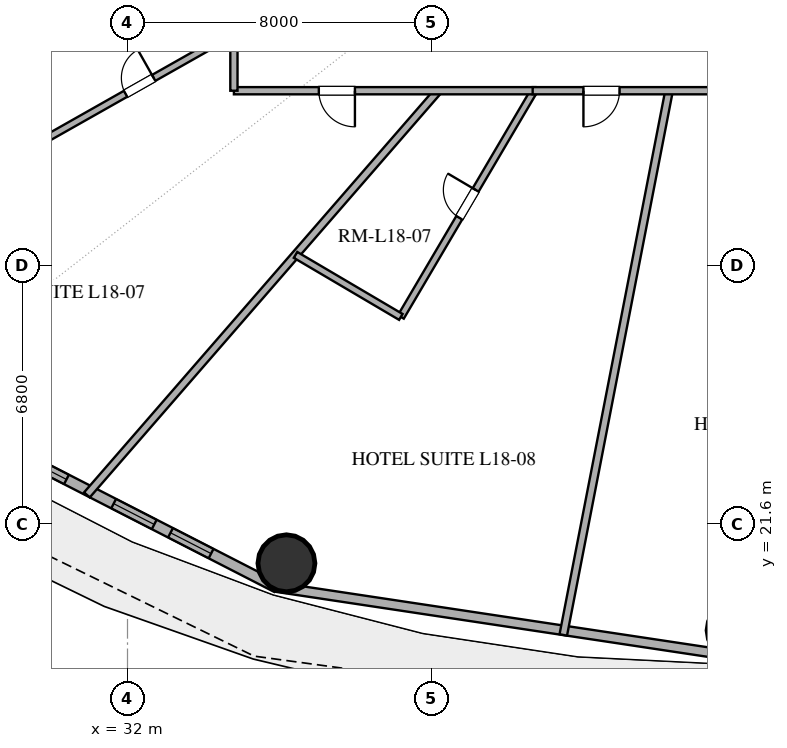
"""IFC4 building model, lengths in metres.
Left out: names, types, materials, properties, quantities, classifications, styles, units other than length and angle.
Written with IfcOpenShell. Run it as: python <this file> out.ifc"""

import sys

from ifc_helpers import new_model, si_unit, direction, frame, frame_2d, origin, origin_2d, place, context, subcontext, project, spatial, rectangle, hollow_circle, extrude, element, fill, save


model = new_model("IFC4")
c1 = context("Model", 3, precision=1e-05, world=origin(), true_north=direction((0.0, 1.0)))
c2 = subcontext(c1, "Body", "Model", "MODEL_VIEW")
j1 = project(units=[si_unit("LENGTHUNIT", "METRE"), si_unit("PLANEANGLEUNIT", "RADIAN")], contexts=[c1])
p1 = place(None, origin())
s1 = spatial("IfcSite", under=j1, at=p1, CompositionType="ELEMENT")
p2 = place(p1, origin())
s2 = spatial("IfcBuilding", under=s1, at=p2, CompositionType="ELEMENT")
p3 = place(p2, frame((0.0, 0.0, 75.0)))
s3 = spatial("IfcBuildingStorey", under=s2, at=p3, CompositionType="ELEMENT", Elevation=75.0)
p4 = place(p3, frame((36.182, 20.566, 0.0), z_axis=(0.0, 0.0, 1.0), x_axis=(1.0, 0.0, 0.0)))
e1 = element("IfcColumn", 1, at=p4, inside=s3, PredefinedType="COLUMN", context=c2, shape_type="SweptSolid", body=[
    extrude(hollow_circle(Radius=0.75, WallThickness=0.04, at=origin_2d()), origin(), (0.0, 0.0, 1.0), 3.25),
])
p5 = place(p3, frame((25.826, 25.114, 0.0), z_axis=(0.0, 0.0, 1.0), x_axis=(0.889853976658, -0.456245438581, 0.0)))
e2 = element("IfcWall", 2, at=p5, inside=s3, PredefinedType="SOLIDWALL", context=c2, shape_type="SweptSolid", body=[
    extrude(rectangle(XDim=11.346, YDim=0.28, at=frame_2d((5.673, 0.0))), origin(), (0.0, 0.0, 1.0), 3.25),
])
p6 = place(p5, frame((2.02, 0.0, 0.85)))
e3 = element("IfcOpeningElement", 3, at=p6, cuts=e2, PredefinedType="OPENING", context=c2, shape_type="SweptSolid", body=[
    extrude(rectangle(XDim=1.35, YDim=1.8, at=frame_2d((0.675, 0.9))), frame((0.0, 0.15, 0.0), z_axis=(0.0, -1.0, 0.0), x_axis=(1.0, 0.0, 0.0)), (0.0, 0.0, 1.0), 0.3),
])
p7 = place(p5, frame((3.784, 0.0, 0.85)))
e4 = element("IfcOpeningElement", 4, at=p7, cuts=e2, PredefinedType="OPENING", context=c2, shape_type="SweptSolid", body=[
    extrude(rectangle(XDim=1.35, YDim=1.8, at=frame_2d((0.675, 0.9))), frame((0.0, 0.15, 0.0), z_axis=(0.0, -1.0, 0.0), x_axis=(1.0, 0.0, 0.0)), (0.0, 0.0, 1.0), 0.3),
])
p8 = place(p5, frame((6.529, 0.0, 0.85)))
e5 = element("IfcOpeningElement", 5, at=p8, cuts=e2, PredefinedType="OPENING", context=c2, shape_type="SweptSolid", body=[
    extrude(rectangle(XDim=1.2, YDim=1.8, at=frame_2d((0.6, 0.9))), frame((0.0, 0.15, 0.0), z_axis=(0.0, -1.0, 0.0), x_axis=(1.0, 0.0, 0.0)), (0.0, 0.0, 1.0), 0.3),
])
p9 = place(p5, frame((8.21, 0.0, 0.85)))
e6 = element("IfcOpeningElement", 6, at=p9, cuts=e2, PredefinedType="OPENING", context=c2, shape_type="SweptSolid", body=[
    extrude(rectangle(XDim=1.2, YDim=1.8, at=frame_2d((0.6, 0.9))), frame((0.0, 0.15, 0.0), z_axis=(0.0, -1.0, 0.0), x_axis=(1.0, 0.0, 0.0)), (0.0, 0.0, 1.0), 0.3),
])
p10 = place(p3, frame((35.922, 19.938, 0.0), z_axis=(0.0, 0.0, 1.0), x_axis=(0.988864835849, -0.148816452121, 0.0)))
e7 = element("IfcWall", 7, at=p10, inside=s3, PredefinedType="SOLIDWALL", context=c2, shape_type="SweptSolid", body=[
    extrude(rectangle(XDim=12.214, YDim=0.25, at=frame_2d((6.107, 0.0))), origin(), (0.0, 0.0, 1.0), 3.25),
])
p11 = place(p3, frame((43.467, 18.681, 0.0), z_axis=(0.0, 0.0, 1.0), x_axis=(0.190799326792, 0.981629062781, 0.0)))
e8 = element("IfcWall", 8, at=p11, inside=s3, PredefinedType="PARTITIONING", context=c2, shape_type="SweptSolid", body=[
    extrude(rectangle(XDim=14.587, YDim=0.2, at=frame_2d((7.293, 0.0))), origin(), (0.0, 0.0, 1.0), 2.61),
])
p12 = place(p3, frame((34.8, 37.455, 0.0), z_axis=(0.0, 0.0, 1.0), x_axis=(-0.945518845989, -0.325567369186, 0.0)))
e9 = element("IfcWall", 9, at=p12, inside=s3, PredefinedType="PARTITIONING", context=c2, shape_type="SweptSolid", body=[
    extrude(rectangle(XDim=15.909, YDim=0.2, at=frame_2d((7.955, 0.0))), origin(), (0.0, 0.0, 1.0), 2.61),
])
p13 = place(p3, frame((40.177, 33.0, 0.0), z_axis=(0.0, 0.0, 1.0), x_axis=(-0.656066321773, -0.754703240641, 0.0)))
e10 = element("IfcWall", 10, at=p13, inside=s3, PredefinedType="PARTITIONING", context=c2, shape_type="SweptSolid", body=[
    extrude(rectangle(XDim=14.091, YDim=0.2, at=frame_2d((7.045, 0.0))), origin(), (0.0, 0.0, 1.0), 2.61),
])
p14 = place(p3, frame((39.193, 27.048, 0.0), z_axis=(0.0, 0.0, 1.0), x_axis=(0.507529744585, 0.861634236995, 0.0)))
e11 = element("IfcWall", 11, at=p14, inside=s3, PredefinedType="PLUMBINGWALL", context=c2, shape_type="SweptSolid", body=[
    extrude(rectangle(XDim=6.908, YDim=0.18, at=frame_2d((3.454, 0.0))), origin(), (0.0, 0.0, 1.0), 2.61),
])
p15 = place(p14, frame((3.029, 0.0, 0.0)))
e12 = element("IfcOpeningElement", 12, at=p15, cuts=e11, PredefinedType="OPENING", context=c2, shape_type="SweptSolid", body=[
    extrude(rectangle(XDim=0.85, YDim=2.1, at=frame_2d((0.425, 1.05))), frame((0.0, 0.1, 0.0), z_axis=(0.0, -1.0, 0.0), x_axis=(1.0, 0.0, 0.0)), (0.0, 0.0, 1.0), 0.2),
])
p16 = place(p3, frame((29.837, 31.724, 0.0), z_axis=(0.0, 0.0, 1.0), x_axis=(0.870364197206, 0.492408533865, 0.0)))
e13 = element("IfcWall", 13, at=p16, inside=s3, PredefinedType="PLUMBINGWALL", context=c2, shape_type="SweptSolid", body=[
    extrude(rectangle(XDim=5.702, YDim=0.18, at=frame_2d((2.851, 0.0))), origin(), (0.0, 0.0, 1.0), 2.61),
])
p17 = place(p16, frame((2.426, 0.0, 0.0)))
e14 = element("IfcOpeningElement", 14, at=p17, cuts=e13, PredefinedType="OPENING", context=c2, shape_type="SweptSolid", body=[
    extrude(rectangle(XDim=0.85, YDim=2.1, at=frame_2d((0.425, 1.05))), frame((0.0, 0.1, 0.0), z_axis=(0.0, -1.0, 0.0), x_axis=(1.0, 0.0, 0.0)), (0.0, 0.0, 1.0), 0.2),
])
p18 = place(p3, frame((42.736, 33.0, 0.0), z_axis=(0.0, 0.0, 1.0), x_axis=(-1.0, 0.0, 0.0)))
e15 = element("IfcWall", 15, at=p18, inside=s3, PredefinedType="PARTITIONING", context=c2, shape_type="SweptSolid", body=[
    extrude(rectangle(XDim=7.936, YDim=0.19, at=frame_2d((3.968, 0.0))), origin(), (0.0, 0.0, 1.0), 2.61),
])
p19 = place(p18, frame((4.751, 0.0, 0.0)))
e16 = element("IfcOpeningElement", 16, at=p19, cuts=e15, PredefinedType="OPENING", context=c2, shape_type="SweptSolid", body=[
    extrude(rectangle(XDim=0.95, YDim=2.15, at=frame_2d((0.475, 1.075))), frame((0.0, 0.105, 0.0), z_axis=(0.0, -1.0, 0.0), x_axis=(1.0, 0.0, 0.0)), (0.0, 0.0, 1.0), 0.21),
])
p20 = place(p3, frame((51.133, 33.0, 0.0), z_axis=(0.0, 0.0, 1.0), x_axis=(-1.0, 0.0, 0.0)))
e17 = element("IfcWall", 17, at=p20, inside=s3, PredefinedType="PARTITIONING", context=c2, shape_type="SweptSolid", body=[
    extrude(rectangle(XDim=8.471, YDim=0.19, at=frame_2d((4.236, 0.0))), origin(), (0.0, 0.0, 1.0), 2.61),
])
p21 = place(p20, frame((1.957, 0.0, 0.0)))
e18 = element("IfcOpeningElement", 18, at=p21, cuts=e17, PredefinedType="OPENING", context=c2, shape_type="SweptSolid", body=[
    extrude(rectangle(XDim=1.0, YDim=2.2, at=frame_2d((0.5, 1.1))), frame((0.0, 0.105, 0.0), z_axis=(0.0, -1.0, 0.0), x_axis=(1.0, 0.0, 0.0)), (0.0, 0.0, 1.0), 0.21),
])
p22 = place(p20, frame((6.185, 0.0, 0.0)))
e19 = element("IfcOpeningElement", 19, at=p22, cuts=e17, PredefinedType="OPENING", context=c2, shape_type="SweptSolid", body=[
    extrude(rectangle(XDim=0.95, YDim=2.15, at=frame_2d((0.475, 1.075))), frame((0.0, 0.105, 0.0), z_axis=(0.0, -1.0, 0.0), x_axis=(1.0, 0.0, 0.0)), (0.0, 0.0, 1.0), 0.21),
])
p23 = place(p3, frame((34.8, 33.0, 0.0), z_axis=(0.0, 0.0, 1.0), x_axis=(0.0, 1.0, 0.0)))
e20 = element("IfcWall", 20, at=p23, inside=s3, PredefinedType="PARTITIONING", context=c2, shape_type="SweptSolid", body=[
    extrude(rectangle(XDim=9.147, YDim=0.19, at=frame_2d((4.574, 0.0))), origin(), (0.0, 0.0, 1.0), 2.61),
])
p24 = place(p23, frame((6.309, 0.0, 0.0)))
e21 = element("IfcOpeningElement", 21, at=p24, cuts=e20, PredefinedType="OPENING", context=c2, shape_type="SweptSolid", body=[
    extrude(rectangle(XDim=0.95, YDim=2.15, at=frame_2d((0.475, 1.075))), frame((0.0, 0.105, 0.0), z_axis=(0.0, -1.0, 0.0), x_axis=(1.0, 0.0, 0.0)), (0.0, 0.0, 1.0), 0.21),
])
p25 = place(p3, frame((36.421, 28.68, 0.0), z_axis=(0.0, 0.0, 1.0), x_axis=(0.861637458593, -0.507524275232, 0.0)))
e22 = element("IfcWall", 22, at=p25, inside=s3, PredefinedType="PLUMBINGWALL", context=c2, shape_type="SweptSolid", body=[
    extrude(rectangle(XDim=3.216, YDim=0.18, at=frame_2d((1.608, 0.0))), origin(), (0.0, 0.0, 1.0), 2.61),
])
p26 = place(p7, origin())
e23 = element("IfcWindow", 23, at=p26, inside=s3, PartitioningType="SINGLE_PANEL", PredefinedType="WINDOW", context=c2, shape_type="SweptSolid", body=[
    extrude(rectangle(XDim=1.35, YDim=1.8, at=frame_2d((0.675, 0.9))), frame((0.0, 0.03, 0.0), z_axis=(0.0, -1.0, 0.0), x_axis=(1.0, 0.0, 0.0)), (0.0, 0.0, 1.0), 0.06),
])
fill(e4, e23)
p27 = place(p8, origin())
e24 = element("IfcWindow", 24, at=p27, inside=s3, PartitioningType="SINGLE_PANEL", PredefinedType="WINDOW", context=c2, shape_type="SweptSolid", body=[
    extrude(rectangle(XDim=1.2, YDim=1.8, at=frame_2d((0.6, 0.9))), frame((0.0, 0.03, 0.0), z_axis=(0.0, -1.0, 0.0), x_axis=(1.0, 0.0, 0.0)), (0.0, 0.0, 1.0), 0.06),
])
fill(e5, e24)
p28 = place(p9, origin())
e25 = element("IfcWindow", 25, at=p28, inside=s3, PartitioningType="SINGLE_PANEL", PredefinedType="WINDOW", context=c2, shape_type="SweptSolid", body=[
    extrude(rectangle(XDim=1.2, YDim=1.8, at=frame_2d((0.6, 0.9))), frame((0.0, 0.03, 0.0), z_axis=(0.0, -1.0, 0.0), x_axis=(1.0, 0.0, 0.0)), (0.0, 0.0, 1.0), 0.06),
])
fill(e6, e25)
p29 = place(p15, origin())
e26 = element("IfcDoor", 26, at=p29, inside=s3, OperationType="SINGLE_SWING_RIGHT", PredefinedType="DOOR", context=c2, shape_type="SweptSolid", body=[
    extrude(rectangle(XDim=0.85, YDim=2.1, at=frame_2d((0.425, 1.05))), frame((0.0, 0.025, 0.0), z_axis=(0.0, -1.0, 0.0), x_axis=(1.0, 0.0, 0.0)), (0.0, 0.0, 1.0), 0.05),
])
fill(e12, e26)
p30 = place(p17, origin())
e27 = element("IfcDoor", 27, at=p30, inside=s3, OperationType="SINGLE_SWING_RIGHT", PredefinedType="DOOR", context=c2, shape_type="SweptSolid", body=[
    extrude(rectangle(XDim=0.85, YDim=2.1, at=frame_2d((0.425, 1.05))), frame((0.0, 0.025, 0.0), z_axis=(0.0, -1.0, 0.0), x_axis=(1.0, 0.0, 0.0)), (0.0, 0.0, 1.0), 0.05),
])
fill(e14, e27)
p31 = place(p19, origin())
e28 = element("IfcDoor", 28, at=p31, inside=s3, OperationType="SINGLE_SWING_LEFT", PredefinedType="DOOR", context=c2, shape_type="SweptSolid", body=[
    extrude(rectangle(XDim=0.95, YDim=2.15, at=frame_2d((0.475, 1.075))), frame((0.0, 0.025, 0.0), z_axis=(0.0, -1.0, 0.0), x_axis=(1.0, 0.0, 0.0)), (0.0, 0.0, 1.0), 0.05),
])
fill(e16, e28)
p32 = place(p22, origin())
e29 = element("IfcDoor", 29, at=p32, inside=s3, OperationType="SINGLE_SWING_RIGHT", PredefinedType="DOOR", context=c2, shape_type="SweptSolid", body=[
    extrude(rectangle(XDim=0.95, YDim=2.15, at=frame_2d((0.475, 1.075))), frame((0.0, 0.025, 0.0), z_axis=(0.0, -1.0, 0.0), x_axis=(1.0, 0.0, 0.0)), (0.0, 0.0, 1.0), 0.05),
])
fill(e19, e29)
save(model, sys.argv[1])
